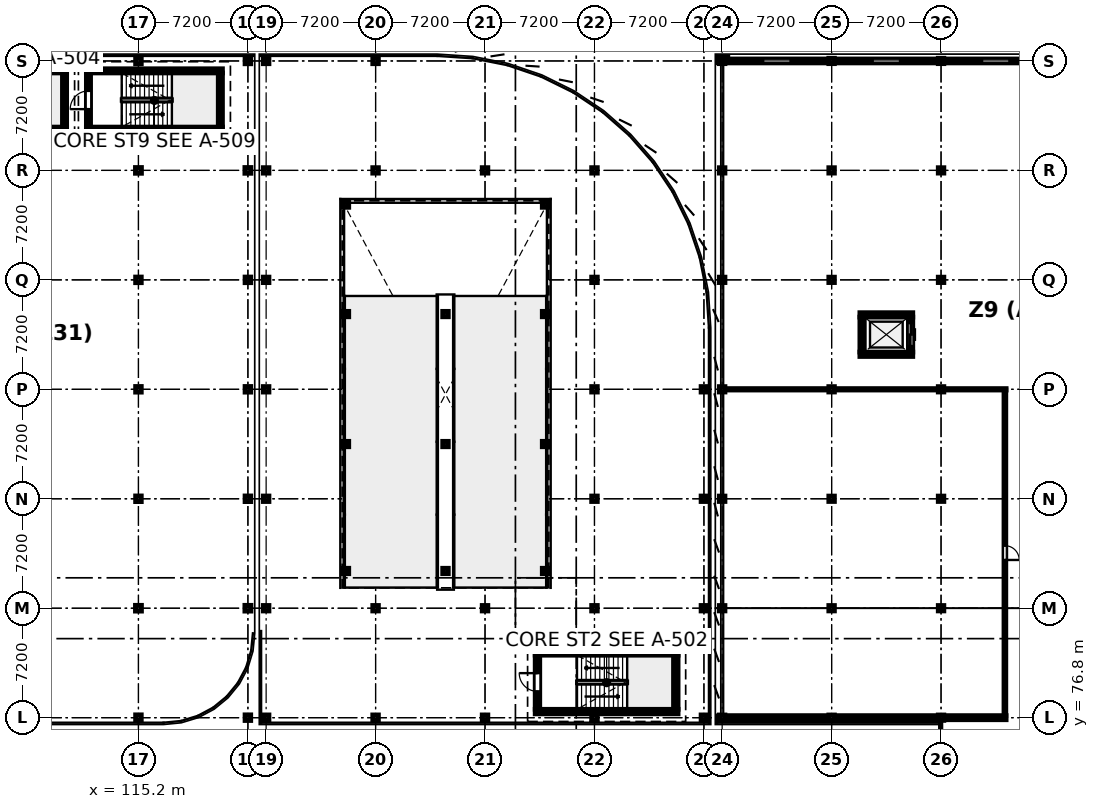
"""IFC4 building model, lengths in metres.
Left out: names, types, materials, properties, quantities, classifications, styles, units other than length and angle.
Written with IfcOpenShell. Run it as: python <this file> out.ifc"""

import sys

from ifc_helpers import new_model, si_unit, direction, frame, frame_2d, origin, origin_2d, place, context, subcontext, project, spatial, rectangle, i_section, extrude, element, fill, save


model = new_model("IFC4")
c1 = context("Model", 3, precision=1e-05, world=origin(), true_north=direction((0.0, 1.0)))
c2 = subcontext(c1, "Body", "Model", "MODEL_VIEW")
j1 = project(units=[si_unit("LENGTHUNIT", "METRE"), si_unit("PLANEANGLEUNIT", "RADIAN")], contexts=[c1])
p1 = place(None, origin())
s1 = spatial("IfcSite", under=j1, at=p1, CompositionType="ELEMENT")
p2 = place(p1, origin())
s2 = spatial("IfcBuilding", under=s1, at=p2, CompositionType="ELEMENT")
p3 = place(p2, frame((0.0, 0.0, 9.3)))
s3 = spatial("IfcBuildingStorey", under=s2, at=p3, CompositionType="ELEMENT", Elevation=9.3)
for number, where, z_axis, x_axis in (
    (1, (123.6, 76.8, 0.0), (0.0, 0.0, 1.0), (1.0, 0.0, 0.0)),
    (2, (123.6, 84.0, 0.0), (0.0, 0.0, 1.0), (1.0, 0.0, 0.0)),
    (3, (123.6, 91.2, 0.0), (0.0, 0.0, 1.0), (1.0, 0.0, 0.0)),
    (4, (123.6, 98.4, 0.0), (0.0, 0.0, 1.0), (1.0, 0.0, 0.0)),
    (5, (123.6, 105.6, 0.0), (0.0, 0.0, 1.0), (1.0, 0.0, 0.0)),
    (6, (123.6, 112.8, 0.0), (0.0, 0.0, 1.0), (1.0, 0.0, 0.0)),
    (7, (123.6, 120.0, 0.0), (0.0, 0.0, 1.0), (1.0, 0.0, 0.0)),
    (8, (130.8, 76.8, 0.0), (0.0, 0.0, 1.0), (1.0, 0.0, 0.0)),
    (9, (130.8, 84.0, 0.0), (0.0, 0.0, 1.0), (1.0, 0.0, 0.0)),
    (10, (130.8, 112.8, 0.0), (0.0, 0.0, 1.0), (1.0, 0.0, 0.0)),
    (11, (130.8, 120.0, 0.0), (0.0, 0.0, 1.0), (1.0, 0.0, 0.0)),
    (12, (138.0, 76.8, 0.0), (0.0, 0.0, 1.0), (1.0, 0.0, 0.0)),
    (13, (138.0, 84.0, 0.0), (0.0, 0.0, 1.0), (1.0, 0.0, 0.0)),
    (14, (138.0, 112.8, 0.0), (0.0, 0.0, 1.0), (1.0, 0.0, 0.0)),
    (15, (145.2, 76.8, 0.0), (0.0, 0.0, 1.0), (1.0, 0.0, 0.0)),
    (16, (145.2, 84.0, 0.0), (0.0, 0.0, 1.0), (1.0, 0.0, 0.0)),
    (17, (145.2, 91.2, 0.0), (0.0, 0.0, 1.0), (1.0, 0.0, 0.0)),
    (18, (145.2, 98.4, 0.0), (0.0, 0.0, 1.0), (1.0, 0.0, 0.0)),
    (19, (145.2, 105.6, 0.0), (0.0, 0.0, 1.0), (1.0, 0.0, 0.0)),
    (20, (145.2, 112.8, 0.0), (0.0, 0.0, 1.0), (1.0, 0.0, 0.0)),
    (21, (152.4, 76.8, 0.0), (0.0, 0.0, 1.0), (1.0, 0.0, 0.0)),
    (22, (152.4, 84.0, 0.0), (0.0, 0.0, 1.0), (1.0, 0.0, 0.0)),
    (23, (152.4, 91.2, 0.0), (0.0, 0.0, 1.0), (1.0, 0.0, 0.0)),
    (24, (152.4, 98.4, 0.0), (0.0, 0.0, 1.0), (1.0, 0.0, 0.0)),
):
    element("IfcColumn", number, at=place(p3, frame(where, z_axis=z_axis, x_axis=x_axis)), inside=s3, PredefinedType="COLUMN", context=c2, shape_type="SweptSolid", body=[
        extrude(i_section(OverallWidth=0.371, OverallDepth=0.363, WebThickness=0.013, FlangeThickness=0.022, FilletRadius=0.015, at=origin_2d()), origin(), (0.0, 0.0, 1.0), 3.9),
    ])
for number, where, z_axis, x_axis in (
    (25, (128.85, 86.45, 0.0), (0.0, 0.0, 1.0), (1.0, 0.0, 0.0)),
    (26, (135.4, 86.45, 0.0), (0.0, 0.0, 1.0), (1.0, 0.0, 0.0)),
    (27, (141.95, 86.45, 0.0), (0.0, 0.0, 1.0), (1.0, 0.0, 0.0)),
    (28, (128.85, 94.8, 0.0), (0.0, 0.0, 1.0), (1.0, 0.0, 0.0)),
    (29, (135.4, 94.8, 0.0), (0.0, 0.0, 1.0), (1.0, 0.0, 0.0)),
    (30, (141.95, 94.8, 0.0), (0.0, 0.0, 1.0), (1.0, 0.0, 0.0)),
    (31, (128.85, 103.35, 0.0), (0.0, 0.0, 1.0), (1.0, 0.0, 0.0)),
    (32, (135.4, 103.35, 0.0), (0.0, 0.0, 1.0), (1.0, 0.0, 0.0)),
    (33, (141.95, 103.35, 0.0), (0.0, 0.0, 1.0), (1.0, 0.0, 0.0)),
    (34, (128.85, 110.55, 0.0), (0.0, 0.0, 1.0), (1.0, 0.0, 0.0)),
    (35, (141.95, 110.55, 0.0), (0.0, 0.0, 1.0), (1.0, 0.0, 0.0)),
):
    element("IfcColumn", number, at=place(p3, frame(where, z_axis=z_axis, x_axis=x_axis)), inside=s3, PredefinedType="COLUMN", context=c2, shape_type="SweptSolid", body=[
        extrude(i_section(OverallWidth=0.368, OverallDepth=0.356, WebThickness=0.011, FlangeThickness=0.018, FilletRadius=0.015, at=origin_2d()), origin(), (0.0, 0.0, 1.0), 3.9),
    ])
p4 = place(p3, frame((115.2, 76.8, 0.0), z_axis=(0.0, 0.0, 1.0), x_axis=(1.0, 0.0, 0.0)))
e36 = element("IfcColumn", 36, at=p4, inside=s3, PredefinedType="COLUMN", context=c2, shape_type="SweptSolid", body=[
    extrude(i_section(OverallWidth=0.373, OverallDepth=0.373, WebThickness=0.016, FlangeThickness=0.026, FilletRadius=0.015, at=origin_2d()), origin(), (0.0, 0.0, 1.0), 3.9),
])
p5 = place(p3, frame((115.2, 84.0, 0.0), z_axis=(0.0, 0.0, 1.0), x_axis=(1.0, 0.0, 0.0)))
e37 = element("IfcColumn", 37, at=p5, inside=s3, PredefinedType="COLUMN", context=c2, shape_type="SweptSolid", body=[
    extrude(i_section(OverallWidth=0.396, OverallDepth=0.381, WebThickness=0.019, FlangeThickness=0.03, FilletRadius=0.015, at=origin_2d()), origin(), (0.0, 0.0, 1.0), 3.9),
])
for number, where, z_axis, x_axis in (
    (38, (115.2, 91.2, 0.0), (0.0, 0.0, 1.0), (1.0, 0.0, 0.0)),
    (39, (115.2, 98.4, 0.0), (0.0, 0.0, 1.0), (1.0, 0.0, 0.0)),
    (40, (115.2, 105.6, 0.0), (0.0, 0.0, 1.0), (1.0, 0.0, 0.0)),
):
    element("IfcColumn", number, at=place(p3, frame(where, z_axis=z_axis, x_axis=x_axis)), inside=s3, PredefinedType="COLUMN", context=c2, shape_type="SweptSolid", body=[
        extrude(i_section(OverallWidth=0.373, OverallDepth=0.373, WebThickness=0.016, FlangeThickness=0.026, FilletRadius=0.015, at=origin_2d()), origin(), (0.0, 0.0, 1.0), 3.9),
    ])
p6 = place(p3, frame((115.2, 112.8, 0.0), z_axis=(0.0, 0.0, 1.0), x_axis=(1.0, 0.0, 0.0)))
e41 = element("IfcColumn", 41, at=p6, inside=s3, PredefinedType="COLUMN", context=c2, shape_type="SweptSolid", body=[
    extrude(i_section(OverallWidth=0.396, OverallDepth=0.381, WebThickness=0.019, FlangeThickness=0.03, FilletRadius=0.015, at=origin_2d()), origin(), (0.0, 0.0, 1.0), 3.9),
])
for number, where, z_axis, x_axis in (
    (42, (115.2, 120.0, 0.0), (0.0, 0.0, 1.0), (1.0, 0.0, 0.0)),
    (43, (122.4, 76.8, 0.0), (0.0, 0.0, 1.0), (1.0, 0.0, 0.0)),
):
    element("IfcColumn", number, at=place(p3, frame(where, z_axis=z_axis, x_axis=x_axis)), inside=s3, PredefinedType="COLUMN", context=c2, shape_type="SweptSolid", body=[
        extrude(i_section(OverallWidth=0.373, OverallDepth=0.373, WebThickness=0.016, FlangeThickness=0.026, FilletRadius=0.015, at=origin_2d()), origin(), (0.0, 0.0, 1.0), 3.9),
    ])
p7 = place(p3, frame((122.4, 84.0, 0.0), z_axis=(0.0, 0.0, 1.0), x_axis=(1.0, 0.0, 0.0)))
e44 = element("IfcColumn", 44, at=p7, inside=s3, PredefinedType="COLUMN", context=c2, shape_type="SweptSolid", body=[
    extrude(i_section(OverallWidth=0.396, OverallDepth=0.381, WebThickness=0.019, FlangeThickness=0.03, FilletRadius=0.015, at=origin_2d()), origin(), (0.0, 0.0, 1.0), 3.9),
])
for number, where, z_axis, x_axis in (
    (45, (122.4, 91.2, 0.0), (0.0, 0.0, 1.0), (1.0, 0.0, 0.0)),
    (46, (122.4, 98.4, 0.0), (0.0, 0.0, 1.0), (1.0, 0.0, 0.0)),
    (47, (122.4, 105.6, 0.0), (0.0, 0.0, 1.0), (1.0, 0.0, 0.0)),
):
    element("IfcColumn", number, at=place(p3, frame(where, z_axis=z_axis, x_axis=x_axis)), inside=s3, PredefinedType="COLUMN", context=c2, shape_type="SweptSolid", body=[
        extrude(i_section(OverallWidth=0.373, OverallDepth=0.373, WebThickness=0.016, FlangeThickness=0.026, FilletRadius=0.015, at=origin_2d()), origin(), (0.0, 0.0, 1.0), 3.9),
    ])
p8 = place(p3, frame((122.4, 112.8, 0.0), z_axis=(0.0, 0.0, 1.0), x_axis=(1.0, 0.0, 0.0)))
e48 = element("IfcColumn", 48, at=p8, inside=s3, PredefinedType="COLUMN", context=c2, shape_type="SweptSolid", body=[
    extrude(i_section(OverallWidth=0.396, OverallDepth=0.381, WebThickness=0.019, FlangeThickness=0.03, FilletRadius=0.015, at=origin_2d()), origin(), (0.0, 0.0, 1.0), 3.9),
])
p9 = place(p3, frame((122.4, 120.0, 0.0), z_axis=(0.0, 0.0, 1.0), x_axis=(1.0, 0.0, 0.0)))
e49 = element("IfcColumn", 49, at=p9, inside=s3, PredefinedType="COLUMN", context=c2, shape_type="SweptSolid", body=[
    extrude(i_section(OverallWidth=0.373, OverallDepth=0.373, WebThickness=0.016, FlangeThickness=0.026, FilletRadius=0.015, at=origin_2d()), origin(), (0.0, 0.0, 1.0), 3.9),
])
for number, where, z_axis, x_axis in (
    (50, (153.6, 76.8, 0.0), (0.0, 0.0, 1.0), (1.0, 0.0, 0.0)),
    (51, (153.6, 84.0, 0.0), (0.0, 0.0, 1.0), (1.0, 0.0, 0.0)),
    (52, (153.6, 91.2, 0.0), (0.0, 0.0, 1.0), (1.0, 0.0, 0.0)),
    (53, (153.6, 98.4, 0.0), (0.0, 0.0, 1.0), (1.0, 0.0, 0.0)),
    (54, (153.6, 105.6, 0.0), (0.0, 0.0, 1.0), (1.0, 0.0, 0.0)),
    (55, (153.6, 112.8, 0.0), (0.0, 0.0, 1.0), (1.0, 0.0, 0.0)),
    (56, (153.6, 120.0, 0.0), (0.0, 0.0, 1.0), (1.0, 0.0, 0.0)),
    (57, (160.8, 76.8, 0.0), (0.0, 0.0, 1.0), (1.0, 0.0, 0.0)),
    (58, (160.8, 84.0, 0.0), (0.0, 0.0, 1.0), (1.0, 0.0, 0.0)),
    (59, (160.8, 91.2, 0.0), (0.0, 0.0, 1.0), (1.0, 0.0, 0.0)),
    (60, (160.8, 98.4, 0.0), (0.0, 0.0, 1.0), (1.0, 0.0, 0.0)),
    (61, (160.8, 105.6, 0.0), (0.0, 0.0, 1.0), (1.0, 0.0, 0.0)),
    (62, (160.8, 112.8, 0.0), (0.0, 0.0, 1.0), (1.0, 0.0, 0.0)),
    (63, (160.8, 120.0, 0.0), (0.0, 0.0, 1.0), (1.0, 0.0, 0.0)),
    (64, (168.0, 76.8, 0.0), (0.0, 0.0, 1.0), (1.0, 0.0, 0.0)),
    (65, (168.0, 84.0, 0.0), (0.0, 0.0, 1.0), (1.0, 0.0, 0.0)),
    (66, (168.0, 91.2, 0.0), (0.0, 0.0, 1.0), (1.0, 0.0, 0.0)),
    (67, (168.0, 98.4, 0.0), (0.0, 0.0, 1.0), (1.0, 0.0, 0.0)),
    (68, (168.0, 105.6, 0.0), (0.0, 0.0, 1.0), (1.0, 0.0, 0.0)),
    (69, (168.0, 112.8, 0.0), (0.0, 0.0, 1.0), (1.0, 0.0, 0.0)),
    (70, (168.0, 120.0, 0.0), (0.0, 0.0, 1.0), (1.0, 0.0, 0.0)),
):
    element("IfcColumn", number, at=place(p3, frame(where, z_axis=z_axis, x_axis=x_axis)), inside=s3, PredefinedType="COLUMN", context=c2, shape_type="SweptSolid", body=[
        extrude(i_section(OverallWidth=0.368, OverallDepth=0.356, WebThickness=0.011, FlangeThickness=0.018, FilletRadius=0.015, at=origin_2d()), origin(), (0.0, 0.0, 1.0), 3.9),
    ])
p10 = place(p3, frame((153.791, 120.0, 0.0), z_axis=(0.0, 0.0, 1.0), x_axis=(1.0, 0.0, 0.0)))
e71 = element("IfcWall", 71, at=p10, inside=s3, PredefinedType="STANDARD", context=c2, shape_type="SweptSolid", body=[
    extrude(rectangle(XDim=6.818, YDim=0.26, at=frame_2d((3.409, 0.0))), origin(), (0.0, 0.0, 1.0), 2.828),
])
p11 = place(p10, frame((2.509, 0.0, 0.9)))
e72 = element("IfcOpeningElement", 72, at=p11, cuts=e71, PredefinedType="OPENING", context=c2, shape_type="SweptSolid", body=[
    extrude(rectangle(XDim=1.8, YDim=1.5, at=frame_2d((0.9, 0.75))), frame((0.0, 0.14, 0.0), z_axis=(0.0, -1.0, 0.0), x_axis=(1.0, 0.0, 0.0)), (0.0, 0.0, 1.0), 0.28),
])
p12 = place(p3, frame((160.991, 120.0, 0.0), z_axis=(0.0, 0.0, 1.0), x_axis=(1.0, 0.0, 0.0)))
e73 = element("IfcWall", 73, at=p12, inside=s3, PredefinedType="STANDARD", context=c2, shape_type="SweptSolid", body=[
    extrude(rectangle(XDim=6.818, YDim=0.26, at=frame_2d((3.409, 0.0))), origin(), (0.0, 0.0, 1.0), 2.828),
])
p13 = place(p12, frame((2.509, 0.0, 0.9)))
e74 = element("IfcOpeningElement", 74, at=p13, cuts=e73, PredefinedType="OPENING", context=c2, shape_type="SweptSolid", body=[
    extrude(rectangle(XDim=1.8, YDim=1.5, at=frame_2d((0.9, 0.75))), frame((0.0, 0.14, 0.0), z_axis=(0.0, -1.0, 0.0), x_axis=(1.0, 0.0, 0.0)), (0.0, 0.0, 1.0), 0.28),
])
p14 = place(p3, frame((168.191, 120.0, 0.0), z_axis=(0.0, 0.0, 1.0), x_axis=(1.0, 0.0, 0.0)))
e75 = element("IfcWall", 75, at=p14, inside=s3, PredefinedType="STANDARD", context=c2, shape_type="SweptSolid", body=[
    extrude(rectangle(XDim=6.818, YDim=0.26, at=frame_2d((3.409, 0.0))), origin(), (0.0, 0.0, 1.0), 2.828),
])
p15 = place(p14, frame((2.509, 0.0, 0.9)))
e76 = element("IfcOpeningElement", 76, at=p15, cuts=e75, PredefinedType="OPENING", context=c2, shape_type="SweptSolid", body=[
    extrude(rectangle(XDim=1.8, YDim=1.5, at=frame_2d((0.9, 0.75))), frame((0.0, 0.14, 0.0), z_axis=(0.0, -1.0, 0.0), x_axis=(1.0, 0.0, 0.0)), (0.0, 0.0, 1.0), 0.28),
])
for number, where, z_axis, x_axis in (
    (77, (150.7, 77.2, 0.0), (0.0, 0.0, 1.0), (-1.0, 0.0, 0.0)),
    (78, (141.3, 81.06, 0.0), (0.0, 0.0, 1.0), (1.0, 0.0, 0.0)),
):
    element("IfcWall", number, at=place(p3, frame(where, z_axis=z_axis, x_axis=x_axis)), inside=s3, PredefinedType="SOLIDWALL", context=c2, shape_type="SweptSolid", body=[
        extrude(rectangle(XDim=9.4, YDim=0.3, at=frame_2d((4.7, 0.0))), origin(), (0.0, 0.0, 1.0), 3.65),
    ])
p16 = place(p3, frame((141.45, 77.35, 0.0), z_axis=(0.0, 0.0, 1.0), x_axis=(0.0, 1.0, 0.0)))
e79 = element("IfcWall", 79, at=p16, inside=s3, PredefinedType="SOLIDWALL", context=c2, shape_type="SweptSolid", body=[
    extrude(rectangle(XDim=3.56, YDim=0.3, at=frame_2d((1.78, 0.0))), origin(), (0.0, 0.0, 1.0), 3.65),
])
p17 = place(p16, frame((1.18, 0.0, 0.0)))
e80 = element("IfcOpeningElement", 80, at=p17, cuts=e79, PredefinedType="OPENING", context=c2, shape_type="SweptSolid", body=[
    extrude(rectangle(XDim=1.2, YDim=2.2, at=frame_2d((0.6, 1.1))), frame((0.0, 0.16, 0.0), z_axis=(0.0, -1.0, 0.0), x_axis=(1.0, 0.0, 0.0)), (0.0, 0.0, 1.0), 0.32),
])
p18 = place(p3, frame((150.55, 80.91, 0.0), z_axis=(0.0, 0.0, 1.0), x_axis=(0.0, -1.0, 0.0)))
e81 = element("IfcWall", 81, at=p18, inside=s3, PredefinedType="SOLIDWALL", context=c2, shape_type="SweptSolid", body=[
    extrude(rectangle(XDim=3.56, YDim=0.3, at=frame_2d((1.78, 0.0))), origin(), (0.0, 0.0, 1.0), 3.65),
])
for number, where, z_axis, x_axis in (
    (82, (110.475, 115.512, 0.0), (0.0, 0.0, 1.0), (-1.0, 0.0, 0.0)),
    (83, (101.575, 119.348, 0.0), (0.0, 0.0, 1.0), (1.0, 0.0, 0.0)),
):
    element("IfcWall", number, at=place(p3, frame(where, z_axis=z_axis, x_axis=x_axis)), inside=s3, PredefinedType="SOLIDWALL", context=c2, shape_type="SweptSolid", body=[
        extrude(rectangle(XDim=8.9, YDim=0.275, at=frame_2d((4.45, 0.0))), origin(), (0.0, 0.0, 1.0), 3.69),
    ])
p19 = place(p3, frame((110.338, 119.21, 0.0), z_axis=(0.0, 0.0, 1.0), x_axis=(0.0, -1.0, 0.0)))
e84 = element("IfcWall", 84, at=p19, inside=s3, PredefinedType="SOLIDWALL", context=c2, shape_type="SweptSolid", body=[
    extrude(rectangle(XDim=3.56, YDim=0.275, at=frame_2d((1.78, 0.0))), origin(), (0.0, 0.0, 1.0), 3.69),
])
for number, where, z_axis, x_axis in (
    (85, (120.725, 115.512, 0.0), (0.0, 0.0, 1.0), (-1.0, 0.0, 0.0)),
    (86, (111.775, 119.348, 0.0), (0.0, 0.0, 1.0), (1.0, 0.0, 0.0)),
):
    element("IfcWall", number, at=place(p3, frame(where, z_axis=z_axis, x_axis=x_axis)), inside=s3, PredefinedType="SOLIDWALL", context=c2, shape_type="SweptSolid", body=[
        extrude(rectangle(XDim=8.95, YDim=0.275, at=frame_2d((4.475, 0.0))), origin(), (0.0, 0.0, 1.0), 3.69),
    ])
p20 = place(p3, frame((111.912, 115.65, 0.0), z_axis=(0.0, 0.0, 1.0), x_axis=(0.0, 1.0, 0.0)))
e87 = element("IfcWall", 87, at=p20, inside=s3, PredefinedType="SOLIDWALL", context=c2, shape_type="SweptSolid", body=[
    extrude(rectangle(XDim=3.56, YDim=0.275, at=frame_2d((1.78, 0.0))), origin(), (0.0, 0.0, 1.0), 3.69),
])
p21 = place(p20, frame((1.18, 0.0, 0.0)))
e88 = element("IfcOpeningElement", 88, at=p21, cuts=e87, PredefinedType="OPENING", context=c2, shape_type="SweptSolid", body=[
    extrude(rectangle(XDim=1.2, YDim=2.2, at=frame_2d((0.6, 1.1))), frame((0.0, 0.147, 0.0), z_axis=(0.0, -1.0, 0.0), x_axis=(1.0, 0.0, 0.0)), (0.0, 0.0, 1.0), 0.295),
])
p22 = place(p3, frame((120.588, 119.21, 0.0), z_axis=(0.0, 0.0, 1.0), x_axis=(0.0, -1.0, 0.0)))
e89 = element("IfcWall", 89, at=p22, inside=s3, PredefinedType="SOLIDWALL", context=c2, shape_type="SweptSolid", body=[
    extrude(rectangle(XDim=3.56, YDim=0.275, at=frame_2d((1.78, 0.0))), origin(), (0.0, 0.0, 1.0), 3.69),
])
for number, where, z_axis, x_axis in (
    (90, (166.14, 100.705, 0.0), (0.0, 0.0, 1.0), (-1.0, 0.0, 0.0)),
    (91, (162.66, 103.295, 0.0), (0.0, 0.0, 1.0), (1.0, 0.0, 0.0)),
):
    element("IfcWall", number, at=place(p3, frame(where, z_axis=z_axis, x_axis=x_axis)), inside=s3, PredefinedType="SHEAR", context=c2, shape_type="SweptSolid", body=[
        extrude(rectangle(XDim=3.48, YDim=0.29, at=frame_2d((1.74, 0.0))), origin(), (0.0, 0.0, 1.0), 3.6),
    ])
p23 = place(p3, frame((162.805, 100.85, 0.0), z_axis=(0.0, 0.0, 1.0), x_axis=(0.0, 1.0, 0.0)))
e92 = element("IfcWall", 92, at=p23, inside=s3, PredefinedType="SHEAR", context=c2, shape_type="SweptSolid", body=[
    extrude(rectangle(XDim=2.3, YDim=0.29, at=frame_2d((1.15, 0.0))), origin(), (0.0, 0.0, 1.0), 3.6),
])
p24 = place(p3, frame((165.995, 103.15, 0.0), z_axis=(0.0, 0.0, 1.0), x_axis=(0.0, -1.0, 0.0)))
e93 = element("IfcWall", 93, at=p24, inside=s3, PredefinedType="SHEAR", context=c2, shape_type="SweptSolid", body=[
    extrude(rectangle(XDim=2.3, YDim=0.29, at=frame_2d((1.15, 0.0))), origin(), (0.0, 0.0, 1.0), 3.6),
])
p25 = place(p24, frame((0.4, 0.0, 0.0)))
e94 = element("IfcOpeningElement", 94, at=p25, cuts=e93, PredefinedType="OPENING", context=c2, shape_type="SweptSolid", body=[
    extrude(rectangle(XDim=1.5, YDim=2.3, at=frame_2d((0.75, 1.15))), frame((0.0, 0.155, 0.0), z_axis=(0.0, -1.0, 0.0), x_axis=(1.0, 0.0, 0.0)), (0.0, 0.0, 1.0), 0.31),
])
p26 = place(p3, frame((172.28, 76.8, 0.0), z_axis=(0.0, 0.0, 1.0), x_axis=(-1.0, 0.0, 0.0)))
e95 = element("IfcWall", 95, at=p26, inside=s3, PredefinedType="PARTITIONING", context=c2, shape_type="SweptSolid", body=[
    extrude(rectangle(XDim=18.548, YDim=0.27, at=frame_2d((9.274, 0.0))), origin(), (0.0, 0.0, 1.0), 2.823),
])
p27 = place(p3, frame((153.732, 98.4, 0.0), z_axis=(0.0, 0.0, 1.0), x_axis=(1.0, 0.0, 0.0)))
e96 = element("IfcWall", 96, at=p27, inside=s3, PredefinedType="PARTITIONING", context=c2, shape_type="SweptSolid", body=[
    extrude(rectangle(XDim=18.548, YDim=0.095, at=frame_2d((9.274, 0.0))), origin(), (0.0, 0.0, 1.0), 2.823),
])
p28 = place(p3, frame((172.2, 98.351, 0.0), z_axis=(0.0, 0.0, 1.0), x_axis=(0.0, -1.0, 0.0)))
e97 = element("IfcWall", 97, at=p28, inside=s3, PredefinedType="PARTITIONING", context=c2, shape_type="SweptSolid", body=[
    extrude(rectangle(XDim=21.414, YDim=0.12, at=frame_2d((10.707, 0.0))), origin(), (0.0, 0.0, 1.0), 2.823),
])
p29 = place(p28, frame((10.237, 0.0, 0.0)))
e98 = element("IfcOpeningElement", 98, at=p29, cuts=e97, PredefinedType="OPENING", context=c2, shape_type="SweptSolid", body=[
    extrude(rectangle(XDim=0.94, YDim=2.1, at=frame_2d((0.47, 1.05))), frame((0.0, 0.07, 0.0), z_axis=(0.0, -1.0, 0.0), x_axis=(1.0, 0.0, 0.0)), (0.0, 0.0, 1.0), 0.14),
])
p30 = place(p11, origin())
e99 = element("IfcWindow", 99, at=p30, inside=s3, PartitioningType="SINGLE_PANEL", PredefinedType="WINDOW", context=c2, shape_type="SweptSolid", body=[
    extrude(rectangle(XDim=1.8, YDim=1.5, at=frame_2d((0.9, 0.75))), frame((0.0, 0.03, 0.0), z_axis=(0.0, -1.0, 0.0), x_axis=(1.0, 0.0, 0.0)), (0.0, 0.0, 1.0), 0.06),
])
fill(e72, e99)
p31 = place(p13, origin())
e100 = element("IfcWindow", 100, at=p31, inside=s3, PartitioningType="SINGLE_PANEL", PredefinedType="WINDOW", context=c2, shape_type="SweptSolid", body=[
    extrude(rectangle(XDim=1.8, YDim=1.5, at=frame_2d((0.9, 0.75))), frame((0.0, 0.03, 0.0), z_axis=(0.0, -1.0, 0.0), x_axis=(1.0, 0.0, 0.0)), (0.0, 0.0, 1.0), 0.06),
])
fill(e74, e100)
p32 = place(p15, origin())
e101 = element("IfcWindow", 101, at=p32, inside=s3, PartitioningType="SINGLE_PANEL", PredefinedType="WINDOW", context=c2, shape_type="SweptSolid", body=[
    extrude(rectangle(XDim=1.8, YDim=1.5, at=frame_2d((0.9, 0.75))), frame((0.0, 0.03, 0.0), z_axis=(0.0, -1.0, 0.0), x_axis=(1.0, 0.0, 0.0)), (0.0, 0.0, 1.0), 0.06),
])
fill(e76, e101)
p33 = place(p17, origin())
e102 = element("IfcDoor", 102, at=p33, inside=s3, OperationType="SINGLE_SWING_RIGHT", PredefinedType="DOOR", context=c2, shape_type="SweptSolid", body=[
    extrude(rectangle(XDim=1.2, YDim=2.2, at=frame_2d((0.6, 1.1))), frame((0.0, 0.025, 0.0), z_axis=(0.0, -1.0, 0.0), x_axis=(1.0, 0.0, 0.0)), (0.0, 0.0, 1.0), 0.05),
])
fill(e80, e102)
p34 = place(p21, origin())
e103 = element("IfcDoor", 103, at=p34, inside=s3, OperationType="SINGLE_SWING_LEFT", PredefinedType="DOOR", context=c2, shape_type="SweptSolid", body=[
    extrude(rectangle(XDim=1.2, YDim=2.2, at=frame_2d((0.6, 1.1))), frame((0.0, 0.025, 0.0), z_axis=(0.0, -1.0, 0.0), x_axis=(1.0, 0.0, 0.0)), (0.0, 0.0, 1.0), 0.05),
])
fill(e88, e103)
p35 = place(p25, origin())
e104 = element("IfcDoor", 104, at=p35, inside=s3, OperationType="DOUBLE_DOOR_SLIDING", PredefinedType="DOOR", context=c2, shape_type="SweptSolid", body=[
    extrude(rectangle(XDim=1.5, YDim=2.3, at=frame_2d((0.75, 1.15))), frame((0.0, 0.025, 0.0), z_axis=(0.0, -1.0, 0.0), x_axis=(1.0, 0.0, 0.0)), (0.0, 0.0, 1.0), 0.05),
])
fill(e94, e104)
p36 = place(p29, origin())
e105 = element("IfcDoor", 105, at=p36, inside=s3, OperationType="SINGLE_SWING_RIGHT", PredefinedType="DOOR", context=c2, shape_type="SweptSolid", body=[
    extrude(rectangle(XDim=0.94, YDim=2.1, at=frame_2d((0.47, 1.05))), frame((0.0, 0.025, 0.0), z_axis=(0.0, -1.0, 0.0), x_axis=(1.0, 0.0, 0.0)), (0.0, 0.0, 1.0), 0.05),
])
fill(e98, e105)
save(model, sys.argv[1])
